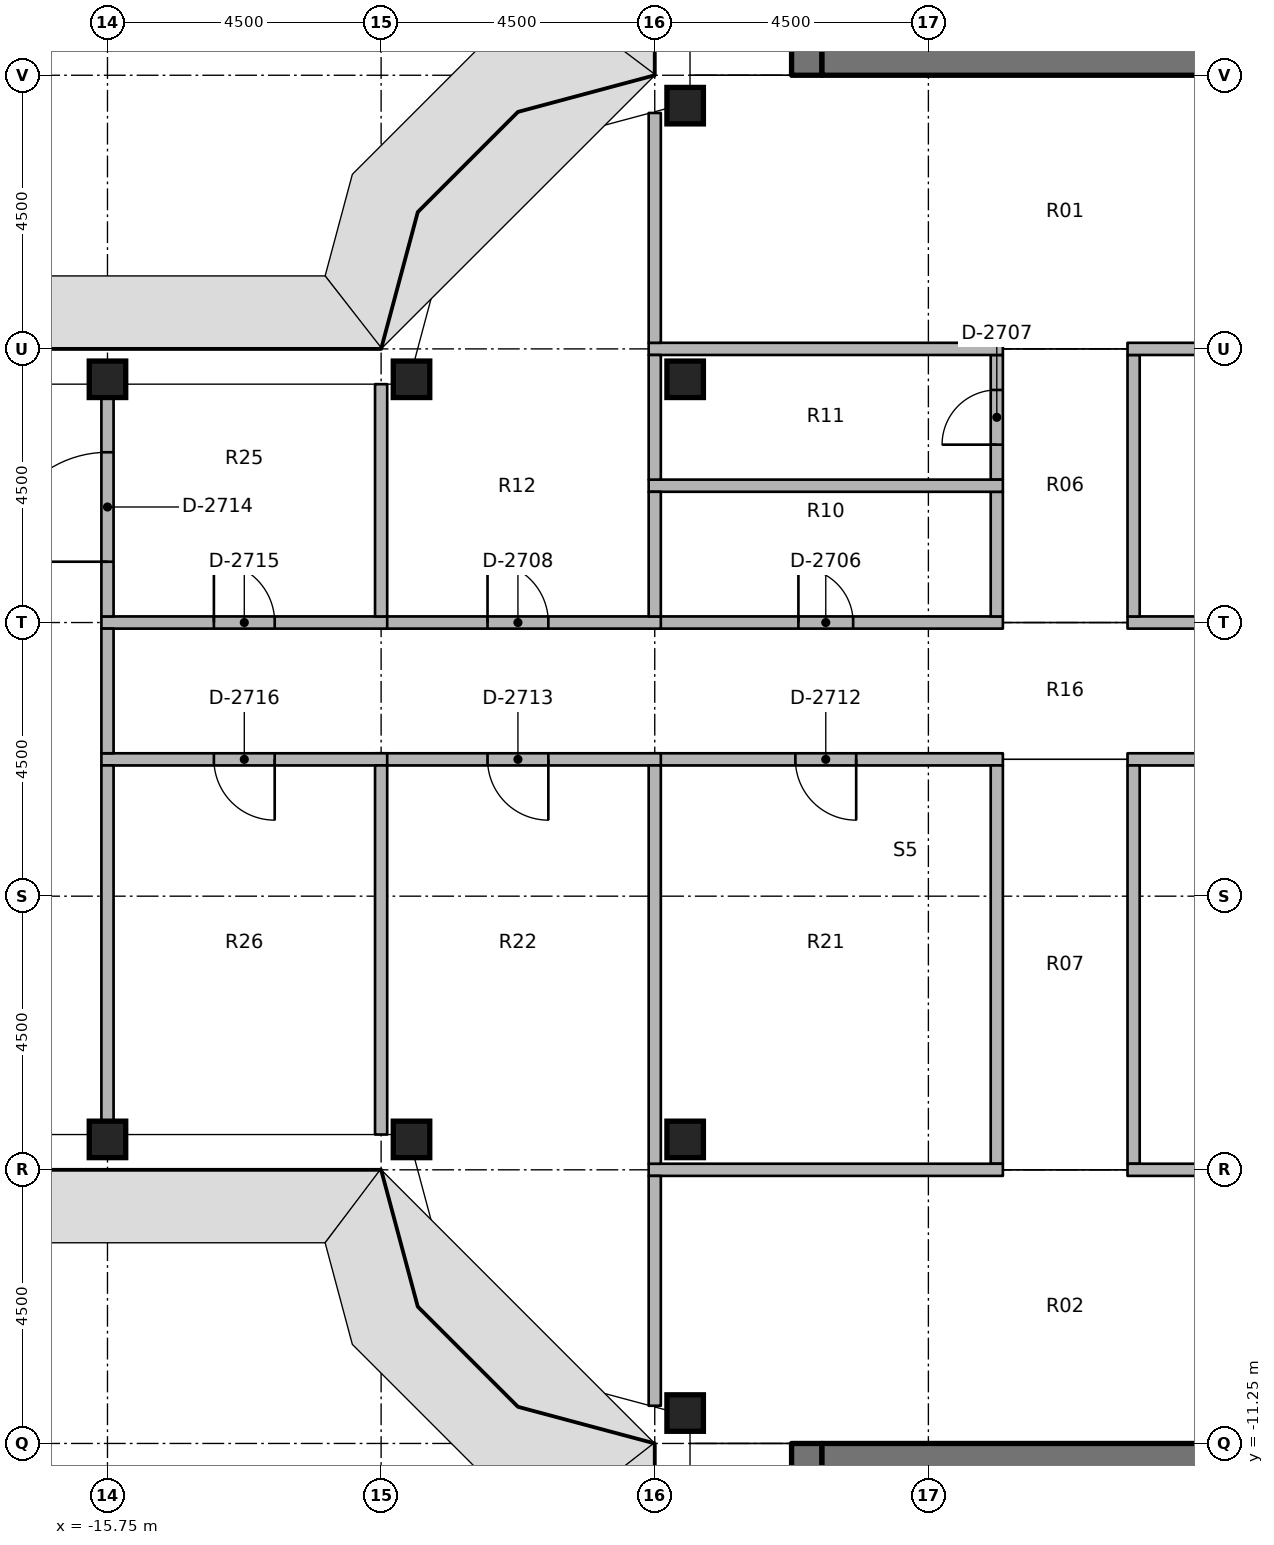
"""IFC4 building model, lengths in metres.
Left out: names, types, materials, properties, quantities, classifications, styles, units other than length and angle.
Written with IfcOpenShell. Run it as: python <this file> out.ifc"""

import sys

from ifc_helpers import new_model, si_unit, direction, frame, frame_2d, origin, origin_2d, place, context, subcontext, project, spatial, rectangle, extrude, element, fill, save


model = new_model("IFC4")
c1 = context("Model", 3, precision=1e-05, world=origin(), true_north=direction((0.0, 1.0)))
c2 = subcontext(c1, "Body", "Model", "MODEL_VIEW")
j1 = project(units=[si_unit("LENGTHUNIT", "METRE"), si_unit("PLANEANGLEUNIT", "RADIAN")], contexts=[c1])
p1 = place(None, origin())
s1 = spatial("IfcSite", under=j1, at=p1, CompositionType="ELEMENT")
p2 = place(p1, origin())
s2 = spatial("IfcBuilding", under=s1, at=p2, CompositionType="ELEMENT")
p3 = place(p2, frame((0.0, 0.0, 253.6)))
s3 = spatial("IfcBuildingStorey", under=s2, at=p3, CompositionType="ELEMENT", Elevation=253.6)
for number, where, z_axis, x_axis in (
    (1, (-15.75, -6.25, 0.0), (0.0, 0.0, 1.0), (1.0, 0.0, 0.0)),
    (2, (-15.75, 6.25, 0.0), (0.0, 0.0, 1.0), (1.0, 0.0, 0.0)),
    (3, (-10.75, -6.25, 0.0), (0.0, 0.0, 1.0), (1.0, 0.0, 0.0)),
    (4, (-10.75, 6.25, 0.0), (0.0, 0.0, 1.0), (1.0, 0.0, 0.0)),
    (5, (-6.25, -10.75, 0.0), (0.0, 0.0, 1.0), (1.0, 0.0, 0.0)),
    (6, (-6.25, -6.25, 0.0), (0.0, 0.0, 1.0), (1.0, 0.0, 0.0)),
    (7, (-6.25, 6.25, 0.0), (0.0, 0.0, 1.0), (1.0, 0.0, 0.0)),
    (8, (-6.25, 10.75, 0.0), (0.0, 0.0, 1.0), (1.0, 0.0, 0.0)),
):
    element("IfcColumn", number, at=place(p3, frame(where, z_axis=z_axis, x_axis=x_axis)), inside=s3, PredefinedType="COLUMN", context=c2, shape_type="SweptSolid", body=[
        extrude(rectangle(XDim=0.6, YDim=0.6, at=origin_2d()), origin(), (0.0, 0.0, 1.0), 3.65),
    ])
p4 = place(p3, frame((-4.25, 11.25, 0.0), z_axis=(0.0, 0.0, 1.0), x_axis=(0.0, 1.0, 0.0)))
e9 = element("IfcWall", 9, at=p4, inside=s3, PredefinedType="SHEAR", context=c2, shape_type="SweptSolid", body=[
    extrude(rectangle(XDim=15.0, YDim=0.5, at=frame_2d((7.5, 0.0))), origin(), (0.0, 0.0, 1.0), 3.8),
])
p5 = place(p4, frame((7.15, 0.0, 0.0)))
e10 = element("IfcOpeningElement", 10, at=p5, cuts=e9, PredefinedType="OPENING", context=c2, shape_type="SweptSolid", body=[
    extrude(rectangle(XDim=1.5, YDim=2.3, at=frame_2d((0.75, 1.15))), frame((0.0, 0.26, 0.0), z_axis=(0.0, -1.0, 0.0), x_axis=(1.0, 0.0, 0.0)), (0.0, 0.0, 1.0), 0.52),
])
p6 = place(p4, frame((13.9, 0.0, 0.0)))
e11 = element("IfcOpeningElement", 11, at=p6, cuts=e9, PredefinedType="OPENING", context=c2, shape_type="SweptSolid", body=[
    extrude(rectangle(XDim=0.9, YDim=2.1, at=frame_2d((0.45, 1.05))), frame((0.0, 0.26, 0.0), z_axis=(0.0, -1.0, 0.0), x_axis=(1.0, 0.0, 0.0)), (0.0, 0.0, 1.0), 0.52),
])
p7 = place(p4, frame((1.15, 0.0, 0.0)))
e12 = element("IfcOpeningElement", 12, at=p7, cuts=e9, PredefinedType="OPENING", context=c2, shape_type="SweptSolid", body=[
    extrude(rectangle(XDim=1.2, YDim=2.1, at=frame_2d((0.6, 1.05))), frame((0.0, 0.26, 0.0), z_axis=(0.0, -1.0, 0.0), x_axis=(1.0, 0.0, 0.0)), (0.0, 0.0, 1.0), 0.52),
])
p8 = place(p3, frame((-4.0, 11.5, 0.0), z_axis=(0.0, 0.0, 1.0), x_axis=(1.0, 0.0, 0.0)))
e13 = element("IfcWall", 13, at=p8, inside=s3, PredefinedType="SHEAR", context=c2, shape_type="SweptSolid", body=[
    extrude(rectangle(XDim=8.0, YDim=0.5, at=frame_2d((4.0, 0.0))), origin(), (0.0, 0.0, 1.0), 3.8),
])
p9 = place(p3, frame((-4.25, -11.25, 0.0), z_axis=(0.0, 0.0, 1.0), x_axis=(0.0, -1.0, 0.0)))
e14 = element("IfcWall", 14, at=p9, inside=s3, PredefinedType="SHEAR", context=c2, shape_type="SweptSolid", body=[
    extrude(rectangle(XDim=15.0, YDim=0.5, at=frame_2d((7.5, 0.0))), origin(), (0.0, 0.0, 1.0), 3.8),
])
p10 = place(p9, frame((7.15, 0.0, 0.0)))
e15 = element("IfcOpeningElement", 15, at=p10, cuts=e14, PredefinedType="OPENING", context=c2, shape_type="SweptSolid", body=[
    extrude(rectangle(XDim=1.5, YDim=2.3, at=frame_2d((0.75, 1.15))), frame((0.0, 0.26, 0.0), z_axis=(0.0, -1.0, 0.0), x_axis=(1.0, 0.0, 0.0)), (0.0, 0.0, 1.0), 0.52),
])
p11 = place(p9, frame((5.55, 0.0, 0.0)))
e16 = element("IfcOpeningElement", 16, at=p11, cuts=e14, PredefinedType="OPENING", context=c2, shape_type="SweptSolid", body=[
    extrude(rectangle(XDim=1.2, YDim=2.1, at=frame_2d((0.6, 1.05))), frame((0.0, 0.26, 0.0), z_axis=(0.0, -1.0, 0.0), x_axis=(1.0, 0.0, 0.0)), (0.0, 0.0, 1.0), 0.52),
])
p12 = place(p3, frame((-4.0, -11.5, 0.0), z_axis=(0.0, 0.0, 1.0), x_axis=(1.0, 0.0, 0.0)))
e17 = element("IfcWall", 17, at=p12, inside=s3, PredefinedType="SHEAR", context=c2, shape_type="SweptSolid", body=[
    extrude(rectangle(XDim=8.0, YDim=0.5, at=frame_2d((4.0, 0.0))), origin(), (0.0, 0.0, 1.0), 3.8),
])
p13 = place(p3, frame((1.025, 2.25, 0.0), z_axis=(0.0, 0.0, 1.0), x_axis=(1.0, 0.0, 0.0)))
e18 = element("IfcWall", 18, at=p13, inside=s3, PredefinedType="PARTITIONING", context=c2, shape_type="SweptSolid", body=[
    extrude(rectangle(XDim=5.825, YDim=0.2, at=frame_2d((2.913, 0.0))), origin(), (0.0, 0.0, 1.0), 2.75),
])
p14 = place(p13, frame((2.413, 0.0, 0.0)))
e19 = element("IfcOpeningElement", 19, at=p14, cuts=e18, PredefinedType="OPENING", context=c2, shape_type="SweptSolid", body=[
    extrude(rectangle(XDim=1.0, YDim=2.1, at=frame_2d((0.5, 1.05))), frame((0.0, 0.11, 0.0), z_axis=(0.0, -1.0, 0.0), x_axis=(1.0, 0.0, 0.0)), (0.0, 0.0, 1.0), 0.22),
])
p15 = place(p3, frame((-6.85, 2.25, 0.0), z_axis=(0.0, 0.0, 1.0), x_axis=(1.0, 0.0, 0.0)))
e20 = element("IfcWall", 20, at=p15, inside=s3, PredefinedType="PARTITIONING", context=c2, shape_type="SweptSolid", body=[
    extrude(rectangle(XDim=5.825, YDim=0.2, at=frame_2d((2.913, 0.0))), origin(), (0.0, 0.0, 1.0), 2.75),
])
p16 = place(p15, frame((2.462, 0.0, 0.0)))
e21 = element("IfcOpeningElement", 21, at=p16, cuts=e20, PredefinedType="OPENING", context=c2, shape_type="SweptSolid", body=[
    extrude(rectangle(XDim=0.9, YDim=2.1, at=frame_2d((0.45, 1.05))), frame((0.0, 0.11, 0.0), z_axis=(0.0, -1.0, 0.0), x_axis=(1.0, 0.0, 0.0)), (0.0, 0.0, 1.0), 0.22),
])
p17 = place(p3, frame((-11.35, 2.25, 0.0), z_axis=(0.0, 0.0, 1.0), x_axis=(1.0, 0.0, 0.0)))
e22 = element("IfcWall", 22, at=p17, inside=s3, PredefinedType="PARTITIONING", context=c2, shape_type="SweptSolid", body=[
    extrude(rectangle(XDim=4.7, YDim=0.2, at=frame_2d((2.35, 0.0))), origin(), (0.0, 0.0, 1.0), 2.75),
])
p18 = place(p17, frame((1.85, 0.0, 0.0)))
e23 = element("IfcOpeningElement", 23, at=p18, cuts=e22, PredefinedType="OPENING", context=c2, shape_type="SweptSolid", body=[
    extrude(rectangle(XDim=1.0, YDim=2.1, at=frame_2d((0.5, 1.05))), frame((0.0, 0.11, 0.0), z_axis=(0.0, -1.0, 0.0), x_axis=(1.0, 0.0, 0.0)), (0.0, 0.0, 1.0), 0.22),
])
p19 = place(p3, frame((6.85, 0.0, 0.0), z_axis=(0.0, 0.0, 1.0), x_axis=(-1.0, 0.0, 0.0)))
e24 = element("IfcWall", 24, at=p19, inside=s3, PredefinedType="PARTITIONING", context=c2, shape_type="SweptSolid", body=[
    extrude(rectangle(XDim=5.825, YDim=0.2, at=frame_2d((2.913, 0.0))), origin(), (0.0, 0.0, 1.0), 2.75),
])
p20 = place(p19, frame((2.413, 0.0, 0.0)))
e25 = element("IfcOpeningElement", 25, at=p20, cuts=e24, PredefinedType="OPENING", context=c2, shape_type="SweptSolid", body=[
    extrude(rectangle(XDim=1.0, YDim=2.1, at=frame_2d((0.5, 1.05))), frame((0.0, 0.11, 0.0), z_axis=(0.0, -1.0, 0.0), x_axis=(1.0, 0.0, 0.0)), (0.0, 0.0, 1.0), 0.22),
])
p21 = place(p3, frame((-1.025, 0.0, 0.0), z_axis=(0.0, 0.0, 1.0), x_axis=(-1.0, 0.0, 0.0)))
e26 = element("IfcWall", 26, at=p21, inside=s3, PredefinedType="PARTITIONING", context=c2, shape_type="SweptSolid", body=[
    extrude(rectangle(XDim=5.825, YDim=0.2, at=frame_2d((2.913, 0.0))), origin(), (0.0, 0.0, 1.0), 2.75),
])
p22 = place(p21, frame((2.413, 0.0, 0.0)))
e27 = element("IfcOpeningElement", 27, at=p22, cuts=e26, PredefinedType="OPENING", context=c2, shape_type="SweptSolid", body=[
    extrude(rectangle(XDim=1.0, YDim=2.1, at=frame_2d((0.5, 1.05))), frame((0.0, 0.11, 0.0), z_axis=(0.0, -1.0, 0.0), x_axis=(1.0, 0.0, 0.0)), (0.0, 0.0, 1.0), 0.22),
])
p23 = place(p3, frame((-6.65, 0.0, 0.0), z_axis=(0.0, 0.0, 1.0), x_axis=(-1.0, 0.0, 0.0)))
e28 = element("IfcWall", 28, at=p23, inside=s3, PredefinedType="PARTITIONING", context=c2, shape_type="SweptSolid", body=[
    extrude(rectangle(XDim=4.7, YDim=0.2, at=frame_2d((2.35, 0.0))), origin(), (0.0, 0.0, 1.0), 2.75),
])
p24 = place(p23, frame((1.85, 0.0, 0.0)))
e29 = element("IfcOpeningElement", 29, at=p24, cuts=e28, PredefinedType="OPENING", context=c2, shape_type="SweptSolid", body=[
    extrude(rectangle(XDim=1.0, YDim=2.1, at=frame_2d((0.5, 1.05))), frame((0.0, 0.11, 0.0), z_axis=(0.0, -1.0, 0.0), x_axis=(1.0, 0.0, 0.0)), (0.0, 0.0, 1.0), 0.22),
])
p25 = place(p3, frame((-15.85, 2.25, 0.0), z_axis=(0.0, 0.0, 1.0), x_axis=(1.0, 0.0, 0.0)))
e30 = element("IfcWall", 30, at=p25, inside=s3, PredefinedType="PARTITIONING", context=c2, shape_type="SweptSolid", body=[
    extrude(rectangle(XDim=4.7, YDim=0.2, at=frame_2d((2.35, 0.0))), origin(), (0.0, 0.0, 1.0), 2.75),
])
p26 = place(p25, frame((1.85, 0.0, 0.0)))
e31 = element("IfcOpeningElement", 31, at=p26, cuts=e30, PredefinedType="OPENING", context=c2, shape_type="SweptSolid", body=[
    extrude(rectangle(XDim=1.0, YDim=2.1, at=frame_2d((0.5, 1.05))), frame((0.0, 0.11, 0.0), z_axis=(0.0, -1.0, 0.0), x_axis=(1.0, 0.0, 0.0)), (0.0, 0.0, 1.0), 0.22),
])
p27 = place(p3, frame((-11.15, 0.0, 0.0), z_axis=(0.0, 0.0, 1.0), x_axis=(-1.0, 0.0, 0.0)))
e32 = element("IfcWall", 32, at=p27, inside=s3, PredefinedType="PARTITIONING", context=c2, shape_type="SweptSolid", body=[
    extrude(rectangle(XDim=4.7, YDim=0.2, at=frame_2d((2.35, 0.0))), origin(), (0.0, 0.0, 1.0), 2.75),
])
p28 = place(p27, frame((1.85, 0.0, 0.0)))
e33 = element("IfcOpeningElement", 33, at=p28, cuts=e32, PredefinedType="OPENING", context=c2, shape_type="SweptSolid", body=[
    extrude(rectangle(XDim=1.0, YDim=2.1, at=frame_2d((0.5, 1.05))), frame((0.0, 0.11, 0.0), z_axis=(0.0, -1.0, 0.0), x_axis=(1.0, 0.0, 0.0)), (0.0, 0.0, 1.0), 0.22),
])
p29 = place(p3, frame((-15.75, 0.1, 0.0), z_axis=(0.0, 0.0, 1.0), x_axis=(0.0, 1.0, 0.0)))
e34 = element("IfcWall", 34, at=p29, inside=s3, PredefinedType="PARTITIONING", context=c2, shape_type="SweptSolid", body=[
    extrude(rectangle(XDim=2.05, YDim=0.2, at=frame_2d((1.025, 0.0))), origin(), (0.0, 0.0, 1.0), 2.75),
])
p30 = place(p3, frame((1.125, 2.35, 0.0), z_axis=(0.0, 0.0, 1.0), x_axis=(0.0, 1.0, 0.0)))
e35 = element("IfcWall", 35, at=p30, inside=s3, PredefinedType="PARTITIONING", context=c2, shape_type="SweptSolid", body=[
    extrude(rectangle(XDim=4.3, YDim=0.2, at=frame_2d((2.15, 0.0))), origin(), (0.0, 0.0, 1.0), 2.75),
])
p31 = place(p3, frame((-1.125, 2.35, 0.0), z_axis=(0.0, 0.0, 1.0), x_axis=(0.0, 1.0, 0.0)))
e36 = element("IfcWall", 36, at=p31, inside=s3, PredefinedType="PARTITIONING", context=c2, shape_type="SweptSolid", body=[
    extrude(rectangle(XDim=2.05, YDim=0.2, at=frame_2d((1.025, 0.0))), origin(), (0.0, 0.0, 1.0), 2.75),
])
p32 = place(p3, frame((-1.125, 4.6, 0.0), z_axis=(0.0, 0.0, 1.0), x_axis=(0.0, 1.0, 0.0)))
e37 = element("IfcWall", 37, at=p32, inside=s3, PredefinedType="PARTITIONING", context=c2, shape_type="SweptSolid", body=[
    extrude(rectangle(XDim=2.05, YDim=0.2, at=frame_2d((1.025, 0.0))), origin(), (0.0, 0.0, 1.0), 2.75),
])
p33 = place(p32, frame((0.575, 0.0, 0.0)))
e38 = element("IfcOpeningElement", 38, at=p33, cuts=e37, PredefinedType="OPENING", context=c2, shape_type="SweptSolid", body=[
    extrude(rectangle(XDim=0.9, YDim=2.1, at=frame_2d((0.45, 1.05))), frame((0.0, 0.11, 0.0), z_axis=(0.0, -1.0, 0.0), x_axis=(1.0, 0.0, 0.0)), (0.0, 0.0, 1.0), 0.22),
])
for number, where, z_axis, x_axis in (
    (39, (1.125, -6.65, 0.0), (0.0, 0.0, 1.0), (0.0, 1.0, 0.0)),
    (40, (-1.125, -6.65, 0.0), (0.0, 0.0, 1.0), (0.0, 1.0, 0.0)),
):
    element("IfcWall", number, at=place(p3, frame(where, z_axis=z_axis, x_axis=x_axis)), inside=s3, PredefinedType="PARTITIONING", context=c2, shape_type="SweptSolid", body=[
        extrude(rectangle(XDim=6.55, YDim=0.2, at=frame_2d((3.275, 0.0))), origin(), (0.0, 0.0, 1.0), 2.75),
    ])
for number, where, z_axis, x_axis in (
    (41, (1.025, 6.75, 0.0), (0.0, 0.0, 1.0), (1.0, 0.0, 0.0)),
    (42, (-6.85, 6.75, 0.0), (0.0, 0.0, 1.0), (1.0, 0.0, 0.0)),
):
    element("IfcWall", number, at=place(p3, frame(where, z_axis=z_axis, x_axis=x_axis)), inside=s3, PredefinedType="PARTITIONING", context=c2, shape_type="SweptSolid", body=[
        extrude(rectangle(XDim=5.825, YDim=0.2, at=frame_2d((2.913, 0.0))), origin(), (0.0, 0.0, 1.0), 2.75),
    ])
p34 = place(p3, frame((-6.75, 6.85, 0.0), z_axis=(0.0, 0.0, 1.0), x_axis=(0.0, 1.0, 0.0)))
e43 = element("IfcWall", 43, at=p34, inside=s3, PredefinedType="PARTITIONING", context=c2, shape_type="SweptSolid", body=[
    extrude(rectangle(XDim=3.78, YDim=0.2, at=frame_2d((1.89, 0.0))), origin(), (0.0, 0.0, 1.0), 2.75),
])
for number, where, z_axis, x_axis in (
    (44, (1.025, -6.75, 0.0), (0.0, 0.0, 1.0), (1.0, 0.0, 0.0)),
    (45, (-6.85, -6.75, 0.0), (0.0, 0.0, 1.0), (1.0, 0.0, 0.0)),
):
    element("IfcWall", number, at=place(p3, frame(where, z_axis=z_axis, x_axis=x_axis)), inside=s3, PredefinedType="PARTITIONING", context=c2, shape_type="SweptSolid", body=[
        extrude(rectangle(XDim=5.825, YDim=0.2, at=frame_2d((2.913, 0.0))), origin(), (0.0, 0.0, 1.0), 2.75),
    ])
p35 = place(p3, frame((-6.75, -10.63, 0.0), z_axis=(0.0, 0.0, 1.0), x_axis=(0.0, 1.0, 0.0)))
e46 = element("IfcWall", 46, at=p35, inside=s3, PredefinedType="PARTITIONING", context=c2, shape_type="SweptSolid", body=[
    extrude(rectangle(XDim=3.78, YDim=0.2, at=frame_2d((1.89, 0.0))), origin(), (0.0, 0.0, 1.0), 2.75),
])
p36 = place(p3, frame((-6.85, 4.5, 0.0), z_axis=(0.0, 0.0, 1.0), x_axis=(1.0, 0.0, 0.0)))
e47 = element("IfcWall", 47, at=p36, inside=s3, PredefinedType="PARTITIONING", context=c2, shape_type="SweptSolid", body=[
    extrude(rectangle(XDim=5.825, YDim=0.2, at=frame_2d((2.913, 0.0))), origin(), (0.0, 0.0, 1.0), 2.75),
])
for number, where, z_axis, x_axis in (
    (48, (-6.75, 2.35, 0.0), (0.0, 0.0, 1.0), (0.0, 1.0, 0.0)),
    (49, (-6.75, 4.6, 0.0), (0.0, 0.0, 1.0), (0.0, 1.0, 0.0)),
):
    element("IfcWall", number, at=place(p3, frame(where, z_axis=z_axis, x_axis=x_axis)), inside=s3, PredefinedType="PARTITIONING", context=c2, shape_type="SweptSolid", body=[
        extrude(rectangle(XDim=2.05, YDim=0.2, at=frame_2d((1.025, 0.0))), origin(), (0.0, 0.0, 1.0), 2.75),
    ])
p37 = place(p3, frame((-11.25, 2.35, 0.0), z_axis=(0.0, 0.0, 1.0), x_axis=(0.0, 1.0, 0.0)))
e50 = element("IfcWall", 50, at=p37, inside=s3, PredefinedType="PARTITIONING", context=c2, shape_type="SweptSolid", body=[
    extrude(rectangle(XDim=3.82, YDim=0.2, at=frame_2d((1.91, 0.0))), origin(), (0.0, 0.0, 1.0), 2.75),
])
p38 = place(p3, frame((-6.75, -6.65, 0.0), z_axis=(0.0, 0.0, 1.0), x_axis=(0.0, 1.0, 0.0)))
e51 = element("IfcWall", 51, at=p38, inside=s3, PredefinedType="PARTITIONING", context=c2, shape_type="SweptSolid", body=[
    extrude(rectangle(XDim=6.55, YDim=0.2, at=frame_2d((3.275, 0.0))), origin(), (0.0, 0.0, 1.0), 2.75),
])
p39 = place(p3, frame((-11.25, -6.17, 0.0), z_axis=(0.0, 0.0, 1.0), x_axis=(0.0, 1.0, 0.0)))
e52 = element("IfcWall", 52, at=p39, inside=s3, PredefinedType="PARTITIONING", context=c2, shape_type="SweptSolid", body=[
    extrude(rectangle(XDim=6.07, YDim=0.2, at=frame_2d((3.035, 0.0))), origin(), (0.0, 0.0, 1.0), 2.75),
])
p40 = place(p3, frame((-15.75, 2.35, 0.0), z_axis=(0.0, 0.0, 1.0), x_axis=(0.0, 1.0, 0.0)))
e53 = element("IfcWall", 53, at=p40, inside=s3, PredefinedType="PARTITIONING", context=c2, shape_type="SweptSolid", body=[
    extrude(rectangle(XDim=3.6, YDim=0.2, at=frame_2d((1.8, 0.0))), origin(), (0.0, 0.0, 1.0), 2.75),
])
p41 = place(p40, frame((0.9, 0.0, 0.0)))
e54 = element("IfcOpeningElement", 54, at=p41, cuts=e53, PredefinedType="OPENING", context=c2, shape_type="SweptSolid", body=[
    extrude(rectangle(XDim=1.8, YDim=2.1, at=frame_2d((0.9, 1.05))), frame((0.0, 0.11, 0.0), z_axis=(0.0, -1.0, 0.0), x_axis=(1.0, 0.0, 0.0)), (0.0, 0.0, 1.0), 0.22),
])
p42 = place(p3, frame((-15.75, -5.95, 0.0), z_axis=(0.0, 0.0, 1.0), x_axis=(0.0, 1.0, 0.0)))
e55 = element("IfcWall", 55, at=p42, inside=s3, PredefinedType="PARTITIONING", context=c2, shape_type="SweptSolid", body=[
    extrude(rectangle(XDim=5.85, YDim=0.2, at=frame_2d((2.925, 0.0))), origin(), (0.0, 0.0, 1.0), 2.75),
])
p43 = place(p16, origin())
e56 = element("IfcDoor", 56, at=p43, inside=s3, OperationType="SINGLE_SWING_RIGHT", PredefinedType="DOOR", context=c2, shape_type="SweptSolid", body=[
    extrude(rectangle(XDim=0.9, YDim=2.1, at=frame_2d((0.45, 1.05))), frame((0.0, 0.025, 0.0), z_axis=(0.0, -1.0, 0.0), x_axis=(1.0, 0.0, 0.0)), (0.0, 0.0, 1.0), 0.05),
])
fill(e21, e56)
p44 = place(p33, origin())
e57 = element("IfcDoor", 57, at=p44, inside=s3, OperationType="SINGLE_SWING_RIGHT", PredefinedType="DOOR", context=c2, shape_type="SweptSolid", body=[
    extrude(rectangle(XDim=0.9, YDim=2.1, at=frame_2d((0.45, 1.05))), frame((0.0, 0.025, 0.0), z_axis=(0.0, -1.0, 0.0), x_axis=(1.0, 0.0, 0.0)), (0.0, 0.0, 1.0), 0.05),
])
fill(e38, e57)
p45 = place(p18, origin())
e58 = element("IfcDoor", 58, at=p45, inside=s3, OperationType="SINGLE_SWING_RIGHT", PredefinedType="DOOR", context=c2, shape_type="SweptSolid", body=[
    extrude(rectangle(XDim=1.0, YDim=2.1, at=frame_2d((0.5, 1.05))), frame((0.0, 0.025, 0.0), z_axis=(0.0, -1.0, 0.0), x_axis=(1.0, 0.0, 0.0)), (0.0, 0.0, 1.0), 0.05),
])
fill(e23, e58)
p46 = place(p22, origin())
e59 = element("IfcDoor", 59, at=p46, inside=s3, OperationType="SINGLE_SWING_RIGHT", PredefinedType="DOOR", context=c2, shape_type="SweptSolid", body=[
    extrude(rectangle(XDim=1.0, YDim=2.1, at=frame_2d((0.5, 1.05))), frame((0.0, 0.025, 0.0), z_axis=(0.0, -1.0, 0.0), x_axis=(1.0, 0.0, 0.0)), (0.0, 0.0, 1.0), 0.05),
])
fill(e27, e59)
p47 = place(p24, origin())
e60 = element("IfcDoor", 60, at=p47, inside=s3, OperationType="SINGLE_SWING_RIGHT", PredefinedType="DOOR", context=c2, shape_type="SweptSolid", body=[
    extrude(rectangle(XDim=1.0, YDim=2.1, at=frame_2d((0.5, 1.05))), frame((0.0, 0.025, 0.0), z_axis=(0.0, -1.0, 0.0), x_axis=(1.0, 0.0, 0.0)), (0.0, 0.0, 1.0), 0.05),
])
fill(e29, e60)
p48 = place(p41, origin())
e61 = element("IfcDoor", 61, at=p48, inside=s3, OperationType="DOUBLE_DOOR_SINGLE_SWING", PredefinedType="DOOR", context=c2, shape_type="SweptSolid", body=[
    extrude(rectangle(XDim=1.8, YDim=2.1, at=frame_2d((0.9, 1.05))), frame((0.0, 0.025, 0.0), z_axis=(0.0, -1.0, 0.0), x_axis=(1.0, 0.0, 0.0)), (0.0, 0.0, 1.0), 0.05),
])
fill(e54, e61)
p49 = place(p26, origin())
e62 = element("IfcDoor", 62, at=p49, inside=s3, OperationType="SINGLE_SWING_RIGHT", PredefinedType="DOOR", context=c2, shape_type="SweptSolid", body=[
    extrude(rectangle(XDim=1.0, YDim=2.1, at=frame_2d((0.5, 1.05))), frame((0.0, 0.025, 0.0), z_axis=(0.0, -1.0, 0.0), x_axis=(1.0, 0.0, 0.0)), (0.0, 0.0, 1.0), 0.05),
])
fill(e31, e62)
p50 = place(p28, origin())
e63 = element("IfcDoor", 63, at=p50, inside=s3, OperationType="SINGLE_SWING_RIGHT", PredefinedType="DOOR", context=c2, shape_type="SweptSolid", body=[
    extrude(rectangle(XDim=1.0, YDim=2.1, at=frame_2d((0.5, 1.05))), frame((0.0, 0.025, 0.0), z_axis=(0.0, -1.0, 0.0), x_axis=(1.0, 0.0, 0.0)), (0.0, 0.0, 1.0), 0.05),
])
fill(e33, e63)
save(model, sys.argv[1])
